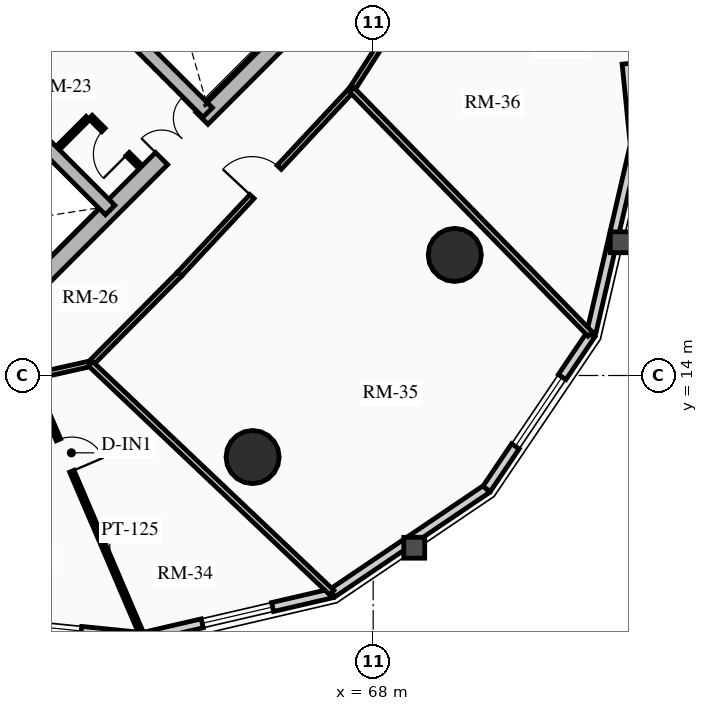
"""IFC4 building model, lengths in metres.
Left out: names, types, materials, properties, quantities, classifications, styles, units other than length and angle.
Written with IfcOpenShell. Run it as: python <this file> out.ifc"""

import sys

from ifc_helpers import new_model, si_unit, direction, frame, frame_2d, origin, origin_2d, place, context, subcontext, project, spatial, rectangle, circle, extrude, source, transform, mapped, element, fill, save


model = new_model("IFC4")
c1 = context("Model", 3, precision=1e-05, world=origin(), true_north=direction((0.0, 1.0)))
c2 = subcontext(c1, "Body", "Model", "MODEL_VIEW")
j1 = project(units=[si_unit("LENGTHUNIT", "METRE"), si_unit("PLANEANGLEUNIT", "RADIAN")], contexts=[c1])
p1 = place(None, origin())
s1 = spatial("IfcSite", under=j1, at=p1, CompositionType="ELEMENT")
p2 = place(p1, origin())
s2 = spatial("IfcBuilding", under=s1, at=p2, CompositionType="ELEMENT")
p3 = place(p2, frame((0.0, 0.0, 78.88)))
s3 = spatial("IfcBuildingStorey", under=s2, at=p3, CompositionType="ELEMENT", Elevation=78.88)
p4 = place(p3, frame((58.578, 15.856, 0.0), z_axis=(0.0, 0.0, 1.0), x_axis=(0.707106781187, 0.707106781187, 0.0)))
e1 = element("IfcWall", 1, at=p4, inside=s3, PredefinedType="SHEAR", context=c2, shape_type="SweptSolid", body=[
    extrude(rectangle(XDim=10.7, YDim=0.45, at=frame_2d((5.35, 0.0))), origin(), (0.0, 0.0, 1.0), 2.91),
])
m1 = source(origin(), c2, "Body", "SweptSolid", [
    extrude(rectangle(XDim=1.5, YDim=2.02, at=frame_2d((0.75, 1.01))), frame((0.0, 0.235, 0.0), z_axis=(0.0, -1.0, 0.0), x_axis=(1.0, 0.0, 0.0)), (0.0, 0.0, 1.0), 0.47),
])
p5 = place(p4, frame((5.45, 0.0, 0.0)))
e2 = element("IfcOpeningElement", 2, at=p5, cuts=e1, PredefinedType="OPENING", context=c2, shape_type="MappedRepresentation", body=[
    mapped(m1, transform((0.0, 0.0, 0.0), x_axis=(1.0, 0.0, 0.0), y_axis=(0.0, 1.0, 0.0), z_axis=(0.0, 0.0, 1.0), scale=1.0)),
])
p6 = place(p3, frame((61.078, 18.355, 0.0), z_axis=(0.0, 0.0, 1.0), x_axis=(-0.707106781187, 0.707106781187, 0.0)))
e3 = element("IfcWall", 3, at=p6, inside=s3, PredefinedType="SHEAR", context=c2, shape_type="SweptSolid", body=[
    extrude(rectangle(XDim=13.75, YDim=0.35, at=frame_2d((6.875, 0.0))), origin(), (0.0, 0.0, 1.0), 2.91),
])
m2 = source(origin(), c2, "Body", "SweptSolid", [
    extrude(rectangle(XDim=1.1, YDim=2.015, at=frame_2d((0.55, 1.007))), frame((0.0, 0.185, 0.0), z_axis=(0.0, -1.0, 0.0), x_axis=(1.0, 0.0, 0.0)), (0.0, 0.0, 1.0), 0.37),
])
p7 = place(p6, frame((4.875, 0.0, 0.0)))
e4 = element("IfcOpeningElement", 4, at=p7, cuts=e3, PredefinedType="OPENING", context=c2, shape_type="MappedRepresentation", body=[
    mapped(m2, transform((0.0, 0.0, 0.0), x_axis=(1.0, 0.0, 0.0), y_axis=(0.0, 1.0, 0.0), z_axis=(0.0, 0.0, 1.0), scale=1.0)),
])
m3 = source(origin(), c2, "Body", "SweptSolid", [
    extrude(rectangle(XDim=1.15, YDim=2.02, at=frame_2d((0.575, 1.01))), frame((0.0, 0.185, 0.0), z_axis=(0.0, -1.0, 0.0), x_axis=(1.0, 0.0, 0.0)), (0.0, 0.0, 1.0), 0.37),
])
p8 = place(p6, frame((7.295, 0.0, 0.0)))
e5 = element("IfcOpeningElement", 5, at=p8, cuts=e3, PredefinedType="OPENING", context=c2, shape_type="MappedRepresentation", body=[
    mapped(m3, transform((0.0, 0.0, 0.0), x_axis=(1.0, 0.0, 0.0), y_axis=(0.0, 1.0, 0.0), z_axis=(0.0, 0.0, 1.0), scale=1.0)),
])
p9 = place(p3, frame((63.645, 20.922, 0.0), z_axis=(0.0, 0.0, 1.0), x_axis=(-0.707106781187, 0.707106781187, 0.0)))
e6 = element("IfcWall", 6, at=p9, inside=s3, PredefinedType="SHEAR", context=c2, shape_type="SweptSolid", body=[
    extrude(rectangle(XDim=13.75, YDim=0.35, at=frame_2d((6.875, 0.0))), origin(), (0.0, 0.0, 1.0), 2.91),
])
p10 = place(p9, frame((10.0, 0.0, 0.0)))
e7 = element("IfcOpeningElement", 7, at=p10, cuts=e6, PredefinedType="OPENING", context=c2, shape_type="MappedRepresentation", body=[
    mapped(m2, transform((0.0, 0.0, 0.0), x_axis=(1.0, 0.0, 0.0), y_axis=(0.0, 1.0, 0.0), z_axis=(0.0, 0.0, 1.0), scale=1.0)),
])
p11 = place(p9, frame((12.0, 0.0, 0.0)))
e8 = element("IfcOpeningElement", 8, at=p11, cuts=e6, PredefinedType="OPENING", context=c2, shape_type="MappedRepresentation", body=[
    mapped(m2, transform((0.0, 0.0, 0.0), x_axis=(1.0, 0.0, 0.0), y_axis=(0.0, 1.0, 0.0), z_axis=(0.0, 0.0, 1.0), scale=1.0)),
])
p12 = place(p9, frame((5.305, 0.0, 0.0)))
e9 = element("IfcOpeningElement", 9, at=p12, cuts=e6, PredefinedType="OPENING", context=c2, shape_type="MappedRepresentation", body=[
    mapped(m3, transform((0.0, 0.0, 0.0), x_axis=(1.0, 0.0, 0.0), y_axis=(0.0, 1.0, 0.0), z_axis=(0.0, 0.0, 1.0), scale=1.0)),
])
for number, where, z_axis, x_axis in (
    (10, (64.827, 11.854, 0.0), (0.0, 0.0, 1.0), (1.0, 0.0, 0.0)),
    (11, (70.146, 17.173, 0.0), (0.0, 0.0, 1.0), (1.0, 0.0, 0.0)),
):
    element("IfcColumn", number, at=place(p3, frame(where, z_axis=z_axis, x_axis=x_axis)), inside=s3, PredefinedType="USERDEFINED", context=c2, shape_type="SweptSolid", body=[
        extrude(circle(Radius=0.7, at=origin_2d()), origin(), (0.0, 0.0, 1.0), 2.91),
    ])
p13 = place(p3, frame((61.933, 7.115, 0.0), z_axis=(0.0, 0.0, 1.0), x_axis=(-0.994971754311, 0.10015591906, 0.0)))
e12 = element("IfcWall", 12, at=p13, inside=s3, PredefinedType="SOLIDWALL", context=c2, shape_type="SweptSolid", body=[
    extrude(rectangle(XDim=5.448, YDim=0.24, at=frame_2d((2.724, 0.0))), origin(), (0.0, 0.0, 1.0), 2.179),
])
m4 = source(origin(), c2, "Body", "SweptSolid", [
    extrude(rectangle(XDim=2.2, YDim=1.35, at=frame_2d((1.1, 0.675))), frame((0.0, 0.13, 0.0), z_axis=(0.0, -1.0, 0.0), x_axis=(1.0, 0.0, 0.0)), (0.0, 0.0, 1.0), 0.26),
])
p14 = place(p13, frame((1.624, 0.0, 0.65)))
e13 = element("IfcOpeningElement", 13, at=p14, cuts=e12, PredefinedType="OPENING", context=c2, shape_type="MappedRepresentation", body=[
    mapped(m4, transform((0.0, 0.0, 0.0), x_axis=(1.0, 0.0, 0.0), y_axis=(0.0, 1.0, 0.0), z_axis=(0.0, 0.0, 1.0), scale=1.0)),
])
p15 = place(p3, frame((66.92, 8.271, 0.0), z_axis=(0.0, 0.0, 1.0), x_axis=(-0.974165631126, -0.225834725257, 0.0)))
e14 = element("IfcWall", 14, at=p15, inside=s3, PredefinedType="SOLIDWALL", context=c2, shape_type="SweptSolid", body=[
    extrude(rectangle(XDim=5.119, YDim=0.24, at=frame_2d((2.56, 0.0))), origin(), (0.0, 0.0, 1.0), 2.179),
])
m5 = source(origin(), c2, "Body", "SweptSolid", [
    extrude(rectangle(XDim=1.9, YDim=1.35, at=frame_2d((0.95, 0.675))), frame((0.0, 0.13, 0.0), z_axis=(0.0, -1.0, 0.0), x_axis=(1.0, 0.0, 0.0)), (0.0, 0.0, 1.0), 0.26),
])
p16 = place(p15, frame((1.609, 0.0, 0.65)))
e15 = element("IfcOpeningElement", 15, at=p16, cuts=e14, PredefinedType="OPENING", context=c2, shape_type="MappedRepresentation", body=[
    mapped(m5, transform((0.0, 0.0, 0.0), x_axis=(1.0, 0.0, 0.0), y_axis=(0.0, 1.0, 0.0), z_axis=(0.0, 0.0, 1.0), scale=1.0)),
])
p17 = place(p3, frame((70.985, 11.015, 0.0), z_axis=(0.0, 0.0, 1.0), x_axis=(-0.828781148131, -0.559572880421, 0.0)))
e16 = element("IfcWall", 16, at=p17, inside=s3, PredefinedType="SOLIDWALL", context=c2, shape_type="SweptSolid", body=[
    extrude(rectangle(XDim=4.905, YDim=0.24, at=frame_2d((2.452, 0.0))), origin(), (0.0, 0.0, 1.0), 2.179),
])
p18 = place(p3, frame((73.729, 15.08, 0.0), z_axis=(0.0, 0.0, 1.0), x_axis=(-0.559572880421, -0.828781148131, 0.0)))
e17 = element("IfcWall", 17, at=p18, inside=s3, PredefinedType="SOLIDWALL", context=c2, shape_type="SweptSolid", body=[
    extrude(rectangle(XDim=4.905, YDim=0.24, at=frame_2d((2.452, 0.0))), origin(), (0.0, 0.0, 1.0), 2.179),
])
p19 = place(p18, frame((1.352, 0.0, 0.65)))
e18 = element("IfcOpeningElement", 18, at=p19, cuts=e17, PredefinedType="OPENING", context=c2, shape_type="MappedRepresentation", body=[
    mapped(m4, transform((0.0, 0.0, 0.0), x_axis=(1.0, 0.0, 0.0), y_axis=(0.0, 1.0, 0.0), z_axis=(0.0, 0.0, 1.0), scale=1.0)),
])
p20 = place(p3, frame((74.885, 20.067, 0.0), z_axis=(0.0, 0.0, 1.0), x_axis=(-0.225834725257, -0.974165631126, 0.0)))
e19 = element("IfcWall", 19, at=p20, inside=s3, PredefinedType="SOLIDWALL", context=c2, shape_type="SweptSolid", body=[
    extrude(rectangle(XDim=5.119, YDim=0.24, at=frame_2d((2.56, 0.0))), origin(), (0.0, 0.0, 1.0), 2.179),
])
p21 = place(p3, frame((74.339, 25.487, 0.0), z_axis=(0.0, 0.0, 1.0), x_axis=(0.10015591906, -0.994971754311, 0.0)))
e20 = element("IfcWall", 20, at=p21, inside=s3, PredefinedType="SOLIDWALL", context=c2, shape_type="SweptSolid", body=[
    extrude(rectangle(XDim=5.448, YDim=0.24, at=frame_2d((2.724, 0.0))), origin(), (0.0, 0.0, 1.0), 2.179),
])
m6 = source(origin(), c2, "Body", "SweptSolid", [
    extrude(rectangle(XDim=1.15, YDim=2.005, at=frame_2d((0.575, 1.002))), frame((0.0, 0.13, 0.0), z_axis=(0.0, -1.0, 0.0), x_axis=(1.0, 0.0, 0.0)), (0.0, 0.0, 1.0), 0.26),
])
p22 = place(p21, frame((2.149, 0.0, 0.0)))
e21 = element("IfcOpeningElement", 21, at=p22, cuts=e20, PredefinedType="OPENING", context=c2, shape_type="MappedRepresentation", body=[
    mapped(m6, transform((0.0, 0.0, 0.0), x_axis=(1.0, 0.0, 0.0), y_axis=(0.0, 1.0, 0.0), z_axis=(0.0, 0.0, 1.0), scale=1.0)),
])
p23 = place(p3, frame((58.214, 21.467, 0.0), z_axis=(0.0, 0.0, 1.0), x_axis=(0.707106781187, 0.707106781187, 0.0)))
e22 = element("IfcWall", 22, at=p23, inside=s3, PredefinedType="PARTITIONING", context=c2, shape_type="SweptSolid", body=[
    extrude(rectangle(XDim=3.28, YDim=0.2, at=frame_2d((1.64, 0.0))), origin(), (0.0, 0.0, 1.0), 2.655),
])
m7 = source(origin(), c2, "Body", "SweptSolid", [
    extrude(rectangle(XDim=1.5, YDim=2.02, at=frame_2d((0.75, 1.01))), frame((0.0, 0.11, 0.0), z_axis=(0.0, -1.0, 0.0), x_axis=(1.0, 0.0, 0.0)), (0.0, 0.0, 1.0), 0.22),
])
p24 = place(p23, frame((1.55, 0.0, 0.0)))
e23 = element("IfcOpeningElement", 23, at=p24, cuts=e22, PredefinedType="OPENING", context=c2, shape_type="MappedRepresentation", body=[
    mapped(m7, transform((0.0, 0.0, 0.0), x_axis=(1.0, 0.0, 0.0), y_axis=(0.0, 1.0, 0.0), z_axis=(0.0, 0.0, 1.0), scale=1.0)),
])
p25 = place(p3, frame((61.835, 19.529, 0.0), z_axis=(0.0, 0.0, 1.0), x_axis=(-0.707174592913, 0.707038962956, 0.0)))
e24 = element("IfcWall", 24, at=p25, inside=s3, PredefinedType="PARTITIONING", context=c2, shape_type="SweptSolid", body=[
    extrude(rectangle(XDim=1.8, YDim=0.125, at=frame_2d((0.9, 0.0))), origin(), (0.0, 0.0, 1.0), 2.655),
])
m8 = source(origin(), c2, "Body", "SweptSolid", [
    extrude(rectangle(XDim=0.9, YDim=2.005, at=frame_2d((0.45, 1.002))), frame((0.0, 0.073, 0.0), z_axis=(0.0, -1.0, 0.0), x_axis=(1.0, 0.0, 0.0)), (0.0, 0.0, 1.0), 0.145),
])
p26 = place(p25, frame((0.42, 0.0, 0.0)))
e25 = element("IfcOpeningElement", 25, at=p26, cuts=e24, PredefinedType="OPENING", context=c2, shape_type="MappedRepresentation", body=[
    mapped(m8, transform((0.0, 0.0, 0.0), x_axis=(1.0, 0.0, 0.0), y_axis=(0.0, 1.0, 0.0), z_axis=(0.0, 0.0, 1.0), scale=1.0)),
])
p27 = place(p3, frame((59.713, 19.996, 0.0), z_axis=(0.0, 0.0, 1.0), x_axis=(0.707217726, 0.706995818963, 0.0)))
e26 = element("IfcWall", 26, at=p27, inside=s3, PredefinedType="PARTITIONING", context=c2, shape_type="SweptSolid", body=[
    extrude(rectangle(XDim=1.1, YDim=0.125, at=frame_2d((0.55, 0.0))), origin(), (0.0, 0.0, 1.0), 2.655),
])
p28 = place(p3, frame((59.008, 13.963, 0.0), z_axis=(0.0, 0.0, 1.0), x_axis=(0.976020856791, 0.21767702476, 0.0)))
e27 = element("IfcWall", 27, at=p28, inside=s3, PredefinedType="PARTITIONING", context=c2, shape_type="SweptSolid", body=[
    extrude(rectangle(XDim=1.593, YDim=0.15, at=frame_2d((0.796, 0.0))), origin(), (0.0, 0.0, 1.0), 2.225),
])
p29 = place(p3, frame((60.562, 14.31, 0.0), z_axis=(0.0, 0.0, 1.0), x_axis=(0.704566236161, 0.709638230975, 0.0)))
e28 = element("IfcWall", 28, at=p29, inside=s3, PredefinedType="PARTITIONING", context=c2, shape_type="SweptSolid", body=[
    extrude(rectangle(XDim=3.321, YDim=0.15, at=frame_2d((1.661, 0.0))), origin(), (0.0, 0.0, 1.0), 2.225),
])
p30 = place(p3, frame((62.903, 16.667, 0.0), z_axis=(0.0, 0.0, 1.0), x_axis=(0.682371947497, 0.731005147225, 0.0)))
e29 = element("IfcWall", 29, at=p30, inside=s3, PredefinedType="PARTITIONING", context=c2, shape_type="SweptSolid", body=[
    extrude(rectangle(XDim=6.642, YDim=0.15, at=frame_2d((3.321, 0.0))), origin(), (0.0, 0.0, 1.0), 2.225),
])
m9 = source(origin(), c2, "Body", "SweptSolid", [
    extrude(rectangle(XDim=1.05, YDim=2.015, at=frame_2d((0.525, 1.007))), frame((0.0, 0.085, 0.0), z_axis=(0.0, -1.0, 0.0), x_axis=(1.0, 0.0, 0.0)), (0.0, 0.0, 1.0), 0.17),
])
p31 = place(p30, frame((2.796, 0.0, 0.0)))
e30 = element("IfcOpeningElement", 30, at=p31, cuts=e29, PredefinedType="OPENING", context=c2, shape_type="MappedRepresentation", body=[
    mapped(m9, transform((0.0, 0.0, 0.0), x_axis=(1.0, 0.0, 0.0), y_axis=(0.0, 1.0, 0.0), z_axis=(0.0, 0.0, 1.0), scale=1.0)),
])
p32 = place(p3, frame((67.435, 21.521, 0.0), z_axis=(0.0, 0.0, 1.0), x_axis=(0.540777197838, 0.841165870859, 0.0)))
e31 = element("IfcWall", 31, at=p32, inside=s3, PredefinedType="PARTITIONING", context=c2, shape_type="SweptSolid", body=[
    extrude(rectangle(XDim=1.888, YDim=0.15, at=frame_2d((0.944, 0.0))), origin(), (0.0, 0.0, 1.0), 2.225),
])
p33 = place(p3, frame((60.562, 14.31, 0.0), z_axis=(0.0, 0.0, 1.0), x_axis=(0.725582293335, -0.688135404989, 0.0)))
e32 = element("IfcWall", 32, at=p33, inside=s3, PredefinedType="PARTITIONING", context=c2, shape_type="SweptSolid", body=[
    extrude(rectangle(XDim=8.749, YDim=0.16, at=frame_2d((4.375, 0.0))), origin(), (0.0, 0.0, 1.0), 2.179),
])
p34 = place(p3, frame((67.435, 21.521, 0.0), z_axis=(0.0, 0.0, 1.0), x_axis=(0.6983880073, -0.715719352302, 0.0)))
e33 = element("IfcWall", 33, at=p34, inside=s3, PredefinedType="PARTITIONING", context=c2, shape_type="SweptSolid", body=[
    extrude(rectangle(XDim=8.987, YDim=0.16, at=frame_2d((4.494, 0.0))), origin(), (0.0, 0.0, 1.0), 2.179),
])
p35 = place(p3, frame((59.008, 13.963, 0.0), z_axis=(0.0, 0.0, 1.0), x_axis=(0.393439207333, -0.919350635032, 0.0)))
e34 = element("IfcWall", 34, at=p35, inside=s3, PredefinedType="PARTITIONING", context=c2, shape_type="SweptSolid", body=[
    extrude(rectangle(XDim=7.427, YDim=0.125, at=frame_2d((3.713, 0.0))), origin(), (0.0, 0.0, 1.0), 2.179),
])
p36 = place(p35, frame((1.8, 0.0, 0.0)))
e35 = element("IfcOpeningElement", 35, at=p36, cuts=e34, PredefinedType="OPENING", context=c2, shape_type="MappedRepresentation", body=[
    mapped(m8, transform((0.0, 0.0, 0.0), x_axis=(1.0, 0.0, 0.0), y_axis=(0.0, 1.0, 0.0), z_axis=(0.0, 0.0, 1.0), scale=1.0)),
])
m10 = source(origin(), c2, "Body", "SweptSolid", [
    extrude(rectangle(XDim=2.2, YDim=1.35, at=frame_2d((1.1, 0.675))), frame((0.0, 0.03, 0.0), z_axis=(0.0, -1.0, 0.0), x_axis=(1.0, 0.0, 0.0)), (0.0, 0.0, 1.0), 0.06),
])
p37 = place(p14, origin())
e36 = element("IfcWindow", 36, at=p37, inside=s3, PartitioningType="DOUBLE_PANEL_VERTICAL", PredefinedType="WINDOW", context=c2, shape_type="MappedRepresentation", body=[
    mapped(m10, transform((0.0, 0.0, 0.0), x_axis=(1.0, 0.0, 0.0), y_axis=(0.0, 1.0, 0.0), z_axis=(0.0, 0.0, 1.0), scale=1.0)),
])
fill(e13, e36)
m11 = source(origin(), c2, "Body", "SweptSolid", [
    extrude(rectangle(XDim=1.9, YDim=1.35, at=frame_2d((0.95, 0.675))), frame((0.0, 0.03, 0.0), z_axis=(0.0, -1.0, 0.0), x_axis=(1.0, 0.0, 0.0)), (0.0, 0.0, 1.0), 0.06),
])
p38 = place(p16, origin())
e37 = element("IfcWindow", 37, at=p38, inside=s3, PartitioningType="DOUBLE_PANEL_VERTICAL", PredefinedType="WINDOW", context=c2, shape_type="MappedRepresentation", body=[
    mapped(m11, transform((0.0, 0.0, 0.0), x_axis=(1.0, 0.0, 0.0), y_axis=(0.0, 1.0, 0.0), z_axis=(0.0, 0.0, 1.0), scale=1.0)),
])
fill(e15, e37)
p39 = place(p19, origin())
e38 = element("IfcWindow", 38, at=p39, inside=s3, PartitioningType="DOUBLE_PANEL_VERTICAL", PredefinedType="WINDOW", context=c2, shape_type="MappedRepresentation", body=[
    mapped(m10, transform((0.0, 0.0, 0.0), x_axis=(1.0, 0.0, 0.0), y_axis=(0.0, 1.0, 0.0), z_axis=(0.0, 0.0, 1.0), scale=1.0)),
])
fill(e18, e38)
m12 = source(origin(), c2, "Body", "SweptSolid", [
    extrude(rectangle(XDim=1.15, YDim=2.005, at=frame_2d((0.575, 1.002))), frame((0.0, 0.025, 0.0), z_axis=(0.0, -1.0, 0.0), x_axis=(1.0, 0.0, 0.0)), (0.0, 0.0, 1.0), 0.05),
])
p40 = place(p22, origin())
e39 = element("IfcDoor", 39, at=p40, inside=s3, OperationType="SINGLE_SWING_LEFT", PredefinedType="DOOR", context=c2, shape_type="MappedRepresentation", body=[
    mapped(m12, transform((0.0, 0.0, 0.0), x_axis=(1.0, 0.0, 0.0), y_axis=(0.0, 1.0, 0.0), z_axis=(0.0, 0.0, 1.0), scale=1.0)),
])
fill(e21, e39)
m13 = source(origin(), c2, "Body", "SweptSolid", [
    extrude(rectangle(XDim=1.5, YDim=2.02, at=frame_2d((0.75, 1.01))), frame((0.0, 0.025, 0.0), z_axis=(0.0, -1.0, 0.0), x_axis=(1.0, 0.0, 0.0)), (0.0, 0.0, 1.0), 0.05),
])
p41 = place(p5, origin())
e40 = element("IfcDoor", 40, at=p41, inside=s3, OperationType="DOUBLE_DOOR_SINGLE_SWING", PredefinedType="DOOR", context=c2, shape_type="MappedRepresentation", body=[
    mapped(m13, transform((0.0, 0.0, 0.0), x_axis=(1.0, 0.0, 0.0), y_axis=(0.0, 1.0, 0.0), z_axis=(0.0, 0.0, 1.0), scale=1.0)),
])
fill(e2, e40)
m14 = source(origin(), c2, "Body", "SweptSolid", [
    extrude(rectangle(XDim=0.9, YDim=2.005, at=frame_2d((0.45, 1.002))), frame((0.0, 0.025, 0.0), z_axis=(0.0, -1.0, 0.0), x_axis=(1.0, 0.0, 0.0)), (0.0, 0.0, 1.0), 0.05),
])
p42 = place(p26, origin())
e41 = element("IfcDoor", 41, at=p42, inside=s3, OperationType="SINGLE_SWING_LEFT", PredefinedType="DOOR", context=c2, shape_type="MappedRepresentation", body=[
    mapped(m14, transform((0.0, 0.0, 0.0), x_axis=(1.0, 0.0, 0.0), y_axis=(0.0, 1.0, 0.0), z_axis=(0.0, 0.0, 1.0), scale=1.0)),
])
fill(e25, e41)
p43 = place(p36, origin())
e42 = element("IfcDoor", 42, at=p43, inside=s3, OperationType="SINGLE_SWING_RIGHT", PredefinedType="DOOR", context=c2, shape_type="MappedRepresentation", body=[
    mapped(m14, transform((0.0, 0.0, 0.0), x_axis=(1.0, 0.0, 0.0), y_axis=(0.0, 1.0, 0.0), z_axis=(0.0, 0.0, 1.0), scale=1.0)),
])
fill(e35, e42)
m15 = source(origin(), c2, "Body", "SweptSolid", [
    extrude(rectangle(XDim=1.05, YDim=2.015, at=frame_2d((0.525, 1.007))), frame((0.0, 0.025, 0.0), z_axis=(0.0, -1.0, 0.0), x_axis=(1.0, 0.0, 0.0)), (0.0, 0.0, 1.0), 0.05),
])
p44 = place(p31, origin())
e43 = element("IfcDoor", 43, at=p44, inside=s3, OperationType="SINGLE_SWING_LEFT", PredefinedType="DOOR", context=c2, shape_type="MappedRepresentation", body=[
    mapped(m15, transform((0.0, 0.0, 0.0), x_axis=(1.0, 0.0, 0.0), y_axis=(0.0, 1.0, 0.0), z_axis=(0.0, 0.0, 1.0), scale=1.0)),
])
fill(e30, e43)
save(model, sys.argv[1])
